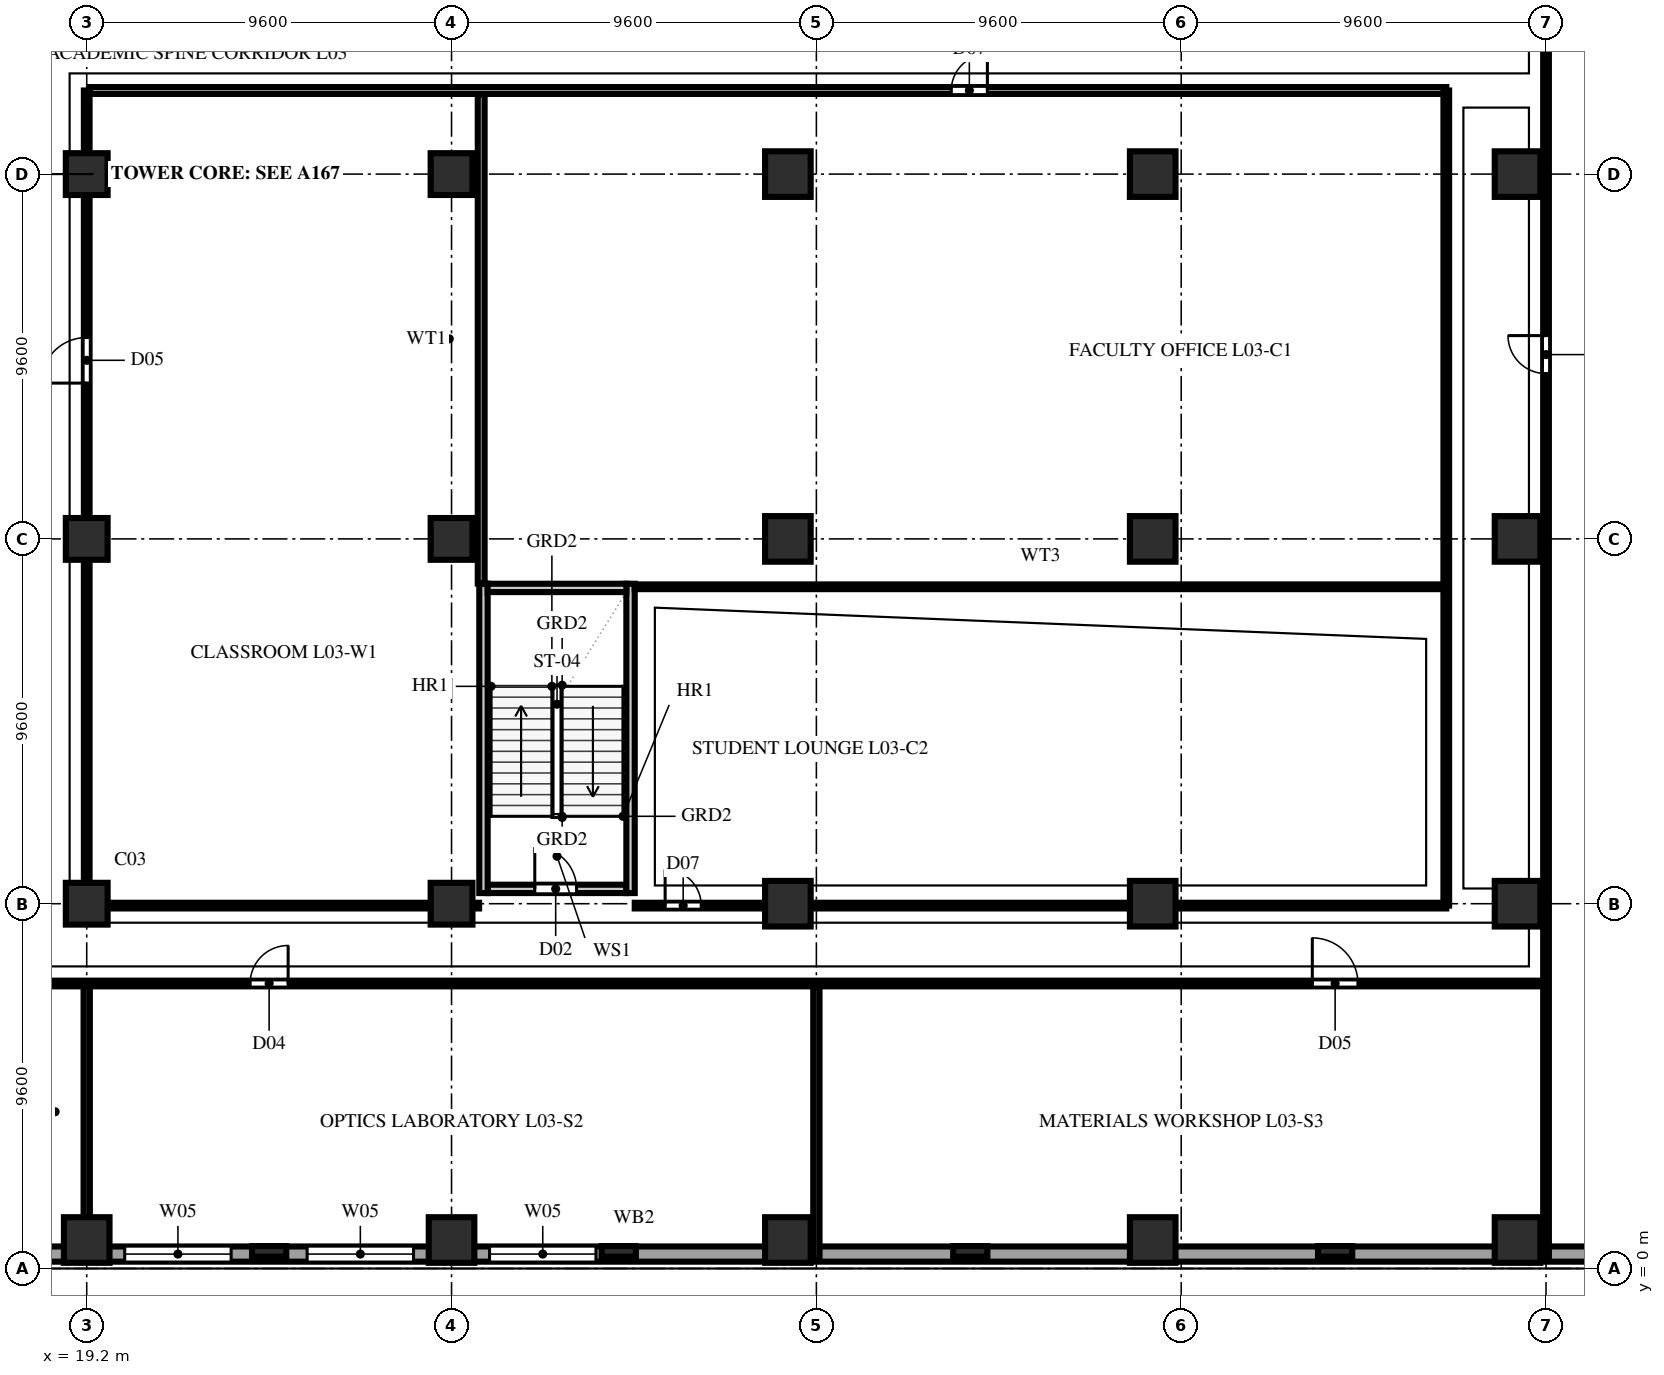
"""IFC4 building model, lengths in metres.
Left out: names, types, materials, properties, quantities, classifications, styles, units other than length and angle.
Written with IfcOpenShell. Run it as: python <this file> out.ifc"""

import sys

from ifc_helpers import new_model, si_unit, direction, frame, frame_2d, origin, origin_2d, place, context, subcontext, project, spatial, rectangle, extrude, element, fill, save


model = new_model("IFC4")
c1 = context("Model", 3, precision=1e-05, world=origin(), true_north=direction((0.0, 1.0)))
c2 = subcontext(c1, "Body", "Model", "MODEL_VIEW")
j1 = project(units=[si_unit("LENGTHUNIT", "METRE"), si_unit("PLANEANGLEUNIT", "RADIAN")], contexts=[c1])
p1 = place(None, origin())
s1 = spatial("IfcSite", under=j1, at=p1, CompositionType="ELEMENT")
p2 = place(p1, origin())
s2 = spatial("IfcBuilding", under=s1, at=p2, CompositionType="ELEMENT")
p3 = place(p2, frame((0.0, 0.0, 15.0)))
s3 = spatial("IfcBuildingStorey", under=s2, at=p3, CompositionType="ELEMENT", Elevation=15.0)
p4 = place(p3, frame((19.2, 0.75, 0.0), z_axis=(0.0, 0.0, 1.0), x_axis=(1.0, 0.0, 0.0)))
e1 = element("IfcColumn", 1, at=p4, inside=s3, PredefinedType="COLUMN", context=c2, shape_type="SweptSolid", body=[
    extrude(rectangle(XDim=1.2, YDim=1.2, at=origin_2d()), origin(), (0.0, 0.0, 1.0), 4.6),
])
for number, where, z_axis, x_axis in (
    (2, (19.2, 9.6, 0.0), (0.0, 0.0, 1.0), (1.0, 0.0, 0.0)),
    (3, (19.2, 19.2, 0.0), (0.0, 0.0, 1.0), (1.0, 0.0, 0.0)),
    (4, (19.2, 28.8, 0.0), (0.0, 0.0, 1.0), (1.0, 0.0, 0.0)),
):
    element("IfcColumn", number, at=place(p3, frame(where, z_axis=z_axis, x_axis=x_axis)), inside=s3, PredefinedType="COLUMN", context=c2, shape_type="SweptSolid", body=[
        extrude(rectangle(XDim=1.1, YDim=1.1, at=origin_2d()), origin(), (0.0, 0.0, 1.0), 4.6),
    ])
p5 = place(p3, frame((28.8, 0.75, 0.0), z_axis=(0.0, 0.0, 1.0), x_axis=(1.0, 0.0, 0.0)))
e5 = element("IfcColumn", 5, at=p5, inside=s3, PredefinedType="COLUMN", context=c2, shape_type="SweptSolid", body=[
    extrude(rectangle(XDim=1.2, YDim=1.2, at=origin_2d()), origin(), (0.0, 0.0, 1.0), 4.6),
])
for number, where, z_axis, x_axis in (
    (6, (28.8, 9.6, 0.0), (0.0, 0.0, 1.0), (1.0, 0.0, 0.0)),
    (7, (28.8, 19.2, 0.0), (0.0, 0.0, 1.0), (1.0, 0.0, 0.0)),
    (8, (28.8, 28.8, 0.0), (0.0, 0.0, 1.0), (1.0, 0.0, 0.0)),
):
    element("IfcColumn", number, at=place(p3, frame(where, z_axis=z_axis, x_axis=x_axis)), inside=s3, PredefinedType="COLUMN", context=c2, shape_type="SweptSolid", body=[
        extrude(rectangle(XDim=1.1, YDim=1.1, at=origin_2d()), origin(), (0.0, 0.0, 1.0), 4.6),
    ])
for number, where, z_axis, x_axis in (
    (9, (37.65, 0.75, 0.0), (0.0, 0.0, 1.0), (1.0, 0.0, 0.0)),
    (10, (37.65, 9.6, 0.0), (0.0, 0.0, 1.0), (1.0, 0.0, 0.0)),
    (11, (37.65, 19.2, 0.0), (0.0, 0.0, 1.0), (1.0, 0.0, 0.0)),
    (12, (37.65, 28.8, 0.0), (0.0, 0.0, 1.0), (1.0, 0.0, 0.0)),
    (13, (47.25, 0.75, 0.0), (0.0, 0.0, 1.0), (1.0, 0.0, 0.0)),
    (14, (47.25, 9.6, 0.0), (0.0, 0.0, 1.0), (1.0, 0.0, 0.0)),
    (15, (47.25, 19.2, 0.0), (0.0, 0.0, 1.0), (1.0, 0.0, 0.0)),
    (16, (47.25, 28.8, 0.0), (0.0, 0.0, 1.0), (1.0, 0.0, 0.0)),
    (17, (56.85, 0.75, 0.0), (0.0, 0.0, 1.0), (1.0, 0.0, 0.0)),
    (18, (56.85, 9.6, 0.0), (0.0, 0.0, 1.0), (1.0, 0.0, 0.0)),
    (19, (56.85, 19.2, 0.0), (0.0, 0.0, 1.0), (1.0, 0.0, 0.0)),
    (20, (56.85, 28.8, 0.0), (0.0, 0.0, 1.0), (1.0, 0.0, 0.0)),
):
    element("IfcColumn", number, at=place(p3, frame(where, z_axis=z_axis, x_axis=x_axis)), inside=s3, PredefinedType="COLUMN", context=c2, shape_type="SweptSolid", body=[
        extrude(rectangle(XDim=1.2, YDim=1.2, at=origin_2d()), origin(), (0.0, 0.0, 1.0), 4.6),
    ])
for number, where, z_axis, x_axis in (
    (21, (24.0, 0.45, 0.0), (0.0, 0.0, 1.0), (1.0, 0.0, 0.0)),
    (22, (33.2, 0.45, 0.0), (0.0, 0.0, 1.0), (1.0, 0.0, 0.0)),
    (23, (42.45, 0.45, 0.0), (0.0, 0.0, 1.0), (1.0, 0.0, 0.0)),
    (24, (52.05, 0.45, 0.0), (0.0, 0.0, 1.0), (1.0, 0.0, 0.0)),
):
    element("IfcColumn", number, at=place(p3, frame(where, z_axis=z_axis, x_axis=x_axis)), inside=s3, PredefinedType="PILASTER", context=c2, shape_type="SweptSolid", body=[
        extrude(rectangle(XDim=0.9, YDim=0.28, at=origin_2d()), origin(), (0.0, 0.0, 1.0), 4.6),
    ])
p6 = place(p3, frame((1.84, 0.38, 0.0), z_axis=(0.0, 0.0, 1.0), x_axis=(1.0, 0.0, 0.0)))
e25 = element("IfcWall", 25, at=p6, inside=s3, PredefinedType="SOLIDWALL", context=c2, shape_type="SweptSolid", body=[
    extrude(rectangle(XDim=63.52, YDim=0.4, at=frame_2d((31.76, 0.0))), origin(), (0.0, 0.0, 1.0), 4.26),
])
p7 = place(p6, frame((3.96, 0.0, 0.75)))
e26 = element("IfcOpeningElement", 26, at=p7, cuts=e25, PredefinedType="OPENING", context=c2, shape_type="SweptSolid", body=[
    extrude(rectangle(XDim=2.8, YDim=2.3, at=frame_2d((1.4, 1.15))), frame((0.0, 0.212, 0.0), z_axis=(0.0, -1.0, 0.0), x_axis=(1.0, 0.0, 0.0)), (0.0, 0.0, 1.0), 0.424),
])
p8 = place(p6, frame((8.76, 0.0, 0.75)))
e27 = element("IfcOpeningElement", 27, at=p8, cuts=e25, PredefinedType="OPENING", context=c2, shape_type="SweptSolid", body=[
    extrude(rectangle(XDim=2.8, YDim=2.3, at=frame_2d((1.4, 1.15))), frame((0.0, 0.212, 0.0), z_axis=(0.0, -1.0, 0.0), x_axis=(1.0, 0.0, 0.0)), (0.0, 0.0, 1.0), 0.424),
])
p9 = place(p6, frame((13.56, 0.0, 0.75)))
e28 = element("IfcOpeningElement", 28, at=p9, cuts=e25, PredefinedType="OPENING", context=c2, shape_type="SweptSolid", body=[
    extrude(rectangle(XDim=2.8, YDim=2.3, at=frame_2d((1.4, 1.15))), frame((0.0, 0.212, 0.0), z_axis=(0.0, -1.0, 0.0), x_axis=(1.0, 0.0, 0.0)), (0.0, 0.0, 1.0), 0.424),
])
p10 = place(p6, frame((18.36, 0.0, 0.75)))
e29 = element("IfcOpeningElement", 29, at=p10, cuts=e25, PredefinedType="OPENING", context=c2, shape_type="SweptSolid", body=[
    extrude(rectangle(XDim=2.8, YDim=2.3, at=frame_2d((1.4, 1.15))), frame((0.0, 0.212, 0.0), z_axis=(0.0, -1.0, 0.0), x_axis=(1.0, 0.0, 0.0)), (0.0, 0.0, 1.0), 0.424),
])
p11 = place(p6, frame((23.16, 0.0, 0.75)))
e30 = element("IfcOpeningElement", 30, at=p11, cuts=e25, PredefinedType="OPENING", context=c2, shape_type="SweptSolid", body=[
    extrude(rectangle(XDim=2.8, YDim=2.3, at=frame_2d((1.4, 1.15))), frame((0.0, 0.212, 0.0), z_axis=(0.0, -1.0, 0.0), x_axis=(1.0, 0.0, 0.0)), (0.0, 0.0, 1.0), 0.424),
])
p12 = place(p6, frame((27.96, 0.0, 0.75)))
e31 = element("IfcOpeningElement", 31, at=p12, cuts=e25, PredefinedType="OPENING", context=c2, shape_type="SweptSolid", body=[
    extrude(rectangle(XDim=2.8, YDim=2.3, at=frame_2d((1.4, 1.15))), frame((0.0, 0.212, 0.0), z_axis=(0.0, -1.0, 0.0), x_axis=(1.0, 0.0, 0.0)), (0.0, 0.0, 1.0), 0.424),
])
p13 = place(p3, frame((29.75, 9.99, 0.0), z_axis=(0.0, 0.0, 1.0), x_axis=(1.0, 0.0, 0.0)))
e32 = element("IfcWall", 32, at=p13, inside=s3, PredefinedType="SOLIDWALL", context=c2, shape_type="SweptSolid", body=[
    extrude(rectangle(XDim=3.65, YDim=0.22, at=frame_2d((1.825, 0.0))), origin(), (0.0, 0.0, 1.0), 4.26),
])
p14 = place(p13, frame((1.24, 0.0, 0.0)))
e33 = element("IfcOpeningElement", 33, at=p14, cuts=e32, PredefinedType="OPENING", context=c2, shape_type="SweptSolid", body=[
    extrude(rectangle(XDim=1.1, YDim=2.2, at=frame_2d((0.55, 1.1))), frame((0.0, 0.122, 0.0), z_axis=(0.0, -1.0, 0.0), x_axis=(1.0, 0.0, 0.0)), (0.0, 0.0, 1.0), 0.244),
])
for number, where, z_axis, x_axis in (
    (34, (29.64, 9.88, 0.0), (0.0, 0.0, 1.0), (0.0, 1.0, 0.0)),
    (35, (33.51, 9.88, 0.0), (0.0, 0.0, 1.0), (0.0, 1.0, 0.0)),
):
    element("IfcWall", number, at=place(p3, frame(where, z_axis=z_axis, x_axis=x_axis)), inside=s3, PredefinedType="SOLIDWALL", context=c2, shape_type="SweptSolid", body=[
        extrude(rectangle(XDim=8.14, YDim=0.22, at=frame_2d((4.07, 0.0))), origin(), (0.0, 0.0, 1.0), 4.26),
    ])
p15 = place(p3, frame((29.75, 17.91, 0.0), z_axis=(0.0, 0.0, 1.0), x_axis=(1.0, 0.0, 0.0)))
e36 = element("IfcWall", 36, at=p15, inside=s3, PredefinedType="SOLIDWALL", context=c2, shape_type="SweptSolid", body=[
    extrude(rectangle(XDim=3.65, YDim=0.22, at=frame_2d((1.825, 0.0))), origin(), (0.0, 0.0, 1.0), 4.26),
])
p16 = place(p3, frame((19.2, 0.22, 0.0), z_axis=(0.0, 0.0, 1.0), x_axis=(0.0, 1.0, 0.0)))
e37 = element("IfcWall", 37, at=p16, inside=s3, PredefinedType="PLUMBINGWALL", context=c2, shape_type="SweptSolid", body=[
    extrude(rectangle(XDim=0.53, YDim=0.165, at=frame_2d((0.265, 0.0))), origin(), (0.0, 0.0, 1.0), 4.26),
])
p17 = place(p3, frame((19.2, 0.75, 0.0), z_axis=(0.0, 0.0, 1.0), x_axis=(0.0, 1.0, 0.0)))
e38 = element("IfcWall", 38, at=p17, inside=s3, PredefinedType="PLUMBINGWALL", context=c2, shape_type="SweptSolid", body=[
    extrude(rectangle(XDim=6.75, YDim=0.165, at=frame_2d((3.375, 0.0))), origin(), (0.0, 0.0, 1.0), 3.644),
])
p18 = place(p3, frame((38.4, 0.22, 0.0), z_axis=(0.0, 0.0, 1.0), x_axis=(0.0, 1.0, 0.0)))
e39 = element("IfcWall", 39, at=p18, inside=s3, PredefinedType="PLUMBINGWALL", context=c2, shape_type="SweptSolid", body=[
    extrude(rectangle(XDim=7.28, YDim=0.165, at=frame_2d((3.64, 0.0))), origin(), (0.0, 0.0, 1.0), 4.26),
])
p19 = place(p3, frame((0.22, 7.5, 0.0), z_axis=(0.0, 0.0, 1.0), x_axis=(1.0, 0.0, 0.0)))
e40 = element("IfcWall", 40, at=p19, inside=s3, PredefinedType="PARTITIONING", context=c2, shape_type="SweptSolid", body=[
    extrude(rectangle(XDim=57.38, YDim=0.15, at=frame_2d((28.69, 0.0))), origin(), (0.0, 0.0, 1.0), 4.26),
])
p20 = place(p19, frame((13.68, 0.0, 0.0)))
e41 = element("IfcOpeningElement", 41, at=p20, cuts=e40, PredefinedType="OPENING", context=c2, shape_type="SweptSolid", body=[
    extrude(rectangle(XDim=1.0, YDim=2.2, at=frame_2d((0.5, 1.1))), frame((0.0, 0.087, 0.0), z_axis=(0.0, -1.0, 0.0), x_axis=(1.0, 0.0, 0.0)), (0.0, 0.0, 1.0), 0.174),
])
p21 = place(p19, frame((23.28, 0.0, 0.0)))
e42 = element("IfcOpeningElement", 42, at=p21, cuts=e40, PredefinedType="OPENING", context=c2, shape_type="SweptSolid", body=[
    extrude(rectangle(XDim=1.0, YDim=2.2, at=frame_2d((0.5, 1.1))), frame((0.0, 0.087, 0.0), z_axis=(0.0, -1.0, 0.0), x_axis=(1.0, 0.0, 0.0)), (0.0, 0.0, 1.0), 0.174),
])
p22 = place(p19, frame((51.23, 0.0, 0.0)))
e43 = element("IfcOpeningElement", 43, at=p22, cuts=e40, PredefinedType="OPENING", context=c2, shape_type="SweptSolid", body=[
    extrude(rectangle(XDim=1.2, YDim=2.2, at=frame_2d((0.6, 1.1))), frame((0.0, 0.087, 0.0), z_axis=(0.0, -1.0, 0.0), x_axis=(1.0, 0.0, 0.0)), (0.0, 0.0, 1.0), 0.174),
])
p23 = place(p3, frame((57.6, 0.22, 0.0), z_axis=(0.0, 0.0, 1.0), x_axis=(0.0, 1.0, 0.0)))
e44 = element("IfcWall", 44, at=p23, inside=s3, PredefinedType="PARTITIONING", context=c2, shape_type="SweptSolid", body=[
    extrude(rectangle(XDim=37.96, YDim=0.15, at=frame_2d((18.98, 0.0))), origin(), (0.0, 0.0, 1.0), 4.26),
])
p24 = place(p23, frame((23.33, 0.0, 0.0)))
e45 = element("IfcOpeningElement", 45, at=p24, cuts=e44, PredefinedType="OPENING", context=c2, shape_type="SweptSolid", body=[
    extrude(rectangle(XDim=1.0, YDim=2.2, at=frame_2d((0.5, 1.1))), frame((0.0, 0.087, 0.0), z_axis=(0.0, -1.0, 0.0), x_axis=(1.0, 0.0, 0.0)), (0.0, 0.0, 1.0), 0.174),
])
p25 = place(p3, frame((19.2, 9.55, 0.0), z_axis=(0.0, 0.0, 1.0), x_axis=(0.0, 1.0, 0.0)))
e46 = element("IfcWall", 46, at=p25, inside=s3, PredefinedType="PARTITIONING", context=c2, shape_type="SweptSolid", body=[
    extrude(rectangle(XDim=21.45, YDim=0.15, at=frame_2d((10.725, 0.0))), origin(), (0.0, 0.0, 1.0), 3.644),
])
p26 = place(p25, frame((13.75, 0.0, 0.0)))
e47 = element("IfcOpeningElement", 47, at=p26, cuts=e46, PredefinedType="OPENING", context=c2, shape_type="SweptSolid", body=[
    extrude(rectangle(XDim=1.2, YDim=2.2, at=frame_2d((0.6, 1.1))), frame((0.0, 0.087, 0.0), z_axis=(0.0, -1.0, 0.0), x_axis=(1.0, 0.0, 0.0)), (0.0, 0.0, 1.0), 0.174),
])
p27 = place(p3, frame((29.58, 18.025, 0.0), z_axis=(0.0, 0.0, 1.0), x_axis=(0.0, 1.0, 0.0)))
e48 = element("IfcWall", 48, at=p27, inside=s3, PredefinedType="PARTITIONING", context=c2, shape_type="SweptSolid", body=[
    extrude(rectangle(XDim=12.88, YDim=0.18, at=frame_2d((6.44, 0.0))), origin(), (0.0, 0.0, 1.0), 4.26),
])
p28 = place(p3, frame((19.28, 31.0, 0.0), z_axis=(0.0, 0.0, 1.0), x_axis=(1.0, 0.0, 0.0)))
e49 = element("IfcWall", 49, at=p28, inside=s3, PredefinedType="PARTITIONING", context=c2, shape_type="SweptSolid", body=[
    extrude(rectangle(XDim=35.695, YDim=0.18, at=frame_2d((17.848, 0.0))), origin(), (0.0, 0.0, 1.0), 4.26),
])
p29 = place(p28, frame((22.67, 0.0, 0.0)))
e50 = element("IfcOpeningElement", 50, at=p29, cuts=e49, PredefinedType="OPENING", context=c2, shape_type="SweptSolid", body=[
    extrude(rectangle(XDim=0.95, YDim=2.15, at=frame_2d((0.475, 1.075))), frame((0.0, 0.102, 0.0), z_axis=(0.0, -1.0, 0.0), x_axis=(1.0, 0.0, 0.0)), (0.0, 0.0, 1.0), 0.204),
])
p30 = place(p3, frame((19.28, 9.55, 0.0), z_axis=(0.0, 0.0, 1.0), x_axis=(1.0, 0.0, 0.0)))
e51 = element("IfcWall", 51, at=p30, inside=s3, PredefinedType="PARTITIONING", context=c2, shape_type="SweptSolid", body=[
    extrude(rectangle(XDim=10.245, YDim=0.15, at=frame_2d((5.123, 0.0))), origin(), (0.0, 0.0, 1.0), 3.644),
])
p31 = place(p3, frame((33.62, 17.94, 0.0), z_axis=(0.0, 0.0, 1.0), x_axis=(1.0, 0.0, 0.0)))
e52 = element("IfcWall", 52, at=p31, inside=s3, PredefinedType="PARTITIONING", context=c2, shape_type="SweptSolid", body=[
    extrude(rectangle(XDim=21.355, YDim=0.125, at=frame_2d((10.677, 0.0))), origin(), (0.0, 0.0, 1.0), 4.26),
])
p32 = place(p3, frame((33.62, 9.55, 0.0), z_axis=(0.0, 0.0, 1.0), x_axis=(1.0, 0.0, 0.0)))
e53 = element("IfcWall", 53, at=p32, inside=s3, PredefinedType="PARTITIONING", context=c2, shape_type="SweptSolid", body=[
    extrude(rectangle(XDim=21.355, YDim=0.15, at=frame_2d((10.677, 0.0))), origin(), (0.0, 0.0, 1.0), 3.644),
])
p33 = place(p32, frame((0.8, 0.0, 0.0)))
e54 = element("IfcOpeningElement", 54, at=p33, cuts=e53, PredefinedType="OPENING", context=c2, shape_type="SweptSolid", body=[
    extrude(rectangle(XDim=0.95, YDim=2.15, at=frame_2d((0.475, 1.075))), frame((0.0, 0.087, 0.0), z_axis=(0.0, -1.0, 0.0), x_axis=(1.0, 0.0, 0.0)), (0.0, 0.0, 1.0), 0.174),
])
p34 = place(p3, frame((54.975, 9.55, 0.0), z_axis=(0.0, 0.0, 1.0), x_axis=(0.0, 1.0, 0.0)))
e55 = element("IfcWall", 55, at=p34, inside=s3, PredefinedType="PARTITIONING", context=c2, shape_type="SweptSolid", body=[
    extrude(rectangle(XDim=21.45, YDim=0.15, at=frame_2d((10.725, 0.0))), origin(), (0.0, 0.0, 1.0), 4.26),
])
p35 = place(p10, origin())
e56 = element("IfcWindow", 56, at=p35, inside=s3, PartitioningType="TRIPLE_PANEL_VERTICAL", PredefinedType="WINDOW", context=c2, shape_type="SweptSolid", body=[
    extrude(rectangle(XDim=2.8, YDim=2.3, at=frame_2d((1.4, 1.15))), frame((0.0, 0.11, 0.0), z_axis=(0.0, -1.0, 0.0), x_axis=(1.0, 0.0, 0.0)), (0.0, 0.0, 1.0), 0.06),
])
fill(e29, e56)
p36 = place(p11, origin())
e57 = element("IfcWindow", 57, at=p36, inside=s3, PartitioningType="TRIPLE_PANEL_VERTICAL", PredefinedType="WINDOW", context=c2, shape_type="SweptSolid", body=[
    extrude(rectangle(XDim=2.8, YDim=2.3, at=frame_2d((1.4, 1.15))), frame((0.0, 0.11, 0.0), z_axis=(0.0, -1.0, 0.0), x_axis=(1.0, 0.0, 0.0)), (0.0, 0.0, 1.0), 0.06),
])
fill(e30, e57)
p37 = place(p12, origin())
e58 = element("IfcWindow", 58, at=p37, inside=s3, PartitioningType="TRIPLE_PANEL_VERTICAL", PredefinedType="WINDOW", context=c2, shape_type="SweptSolid", body=[
    extrude(rectangle(XDim=2.8, YDim=2.3, at=frame_2d((1.4, 1.15))), frame((0.0, 0.11, 0.0), z_axis=(0.0, -1.0, 0.0), x_axis=(1.0, 0.0, 0.0)), (0.0, 0.0, 1.0), 0.06),
])
fill(e31, e58)
p38 = place(p14, origin())
e59 = element("IfcDoor", 59, at=p38, inside=s3, OperationType="SINGLE_SWING_LEFT", PredefinedType="DOOR", context=c2, shape_type="SweptSolid", body=[
    extrude(rectangle(XDim=1.1, YDim=2.2, at=frame_2d((0.55, 1.1))), frame((0.0, 0.025, 0.0), z_axis=(0.0, -1.0, 0.0), x_axis=(1.0, 0.0, 0.0)), (0.0, 0.0, 1.0), 0.05),
])
fill(e33, e59)
p39 = place(p21, origin())
e60 = element("IfcDoor", 60, at=p39, inside=s3, OperationType="SINGLE_SWING_RIGHT", PredefinedType="DOOR", context=c2, shape_type="SweptSolid", body=[
    extrude(rectangle(XDim=1.0, YDim=2.2, at=frame_2d((0.5, 1.1))), frame((0.0, 0.025, 0.0), z_axis=(0.0, -1.0, 0.0), x_axis=(1.0, 0.0, 0.0)), (0.0, 0.0, 1.0), 0.05),
])
fill(e42, e60)
p40 = place(p22, origin())
e61 = element("IfcDoor", 61, at=p40, inside=s3, OperationType="SINGLE_SWING_LEFT", PredefinedType="DOOR", context=c2, shape_type="SweptSolid", body=[
    extrude(rectangle(XDim=1.2, YDim=2.2, at=frame_2d((0.6, 1.1))), frame((0.0, 0.025, 0.0), z_axis=(0.0, -1.0, 0.0), x_axis=(1.0, 0.0, 0.0)), (0.0, 0.0, 1.0), 0.05),
])
fill(e43, e61)
p41 = place(p24, origin())
e62 = element("IfcDoor", 62, at=p41, inside=s3, OperationType="SINGLE_SWING_RIGHT", PredefinedType="DOOR", context=c2, shape_type="SweptSolid", body=[
    extrude(rectangle(XDim=1.0, YDim=2.2, at=frame_2d((0.5, 1.1))), frame((0.0, 0.025, 0.0), z_axis=(0.0, -1.0, 0.0), x_axis=(1.0, 0.0, 0.0)), (0.0, 0.0, 1.0), 0.05),
])
fill(e45, e62)
p42 = place(p26, origin())
e63 = element("IfcDoor", 63, at=p42, inside=s3, OperationType="SINGLE_SWING_LEFT", PredefinedType="DOOR", context=c2, shape_type="SweptSolid", body=[
    extrude(rectangle(XDim=1.2, YDim=2.2, at=frame_2d((0.6, 1.1))), frame((0.0, 0.025, 0.0), z_axis=(0.0, -1.0, 0.0), x_axis=(1.0, 0.0, 0.0)), (0.0, 0.0, 1.0), 0.05),
])
fill(e47, e63)
p43 = place(p29, origin())
e64 = element("IfcDoor", 64, at=p43, inside=s3, OperationType="SINGLE_SWING_RIGHT", PredefinedType="DOOR", context=c2, shape_type="SweptSolid", body=[
    extrude(rectangle(XDim=0.95, YDim=2.15, at=frame_2d((0.475, 1.075))), frame((0.0, 0.025, 0.0), z_axis=(0.0, -1.0, 0.0), x_axis=(1.0, 0.0, 0.0)), (0.0, 0.0, 1.0), 0.05),
])
fill(e50, e64)
p44 = place(p33, origin())
e65 = element("IfcDoor", 65, at=p44, inside=s3, OperationType="SINGLE_SWING_LEFT", PredefinedType="DOOR", context=c2, shape_type="SweptSolid", body=[
    extrude(rectangle(XDim=0.95, YDim=2.15, at=frame_2d((0.475, 1.075))), frame((0.0, 0.025, 0.0), z_axis=(0.0, -1.0, 0.0), x_axis=(1.0, 0.0, 0.0)), (0.0, 0.0, 1.0), 0.05),
])
fill(e54, e65)
save(model, sys.argv[1])
